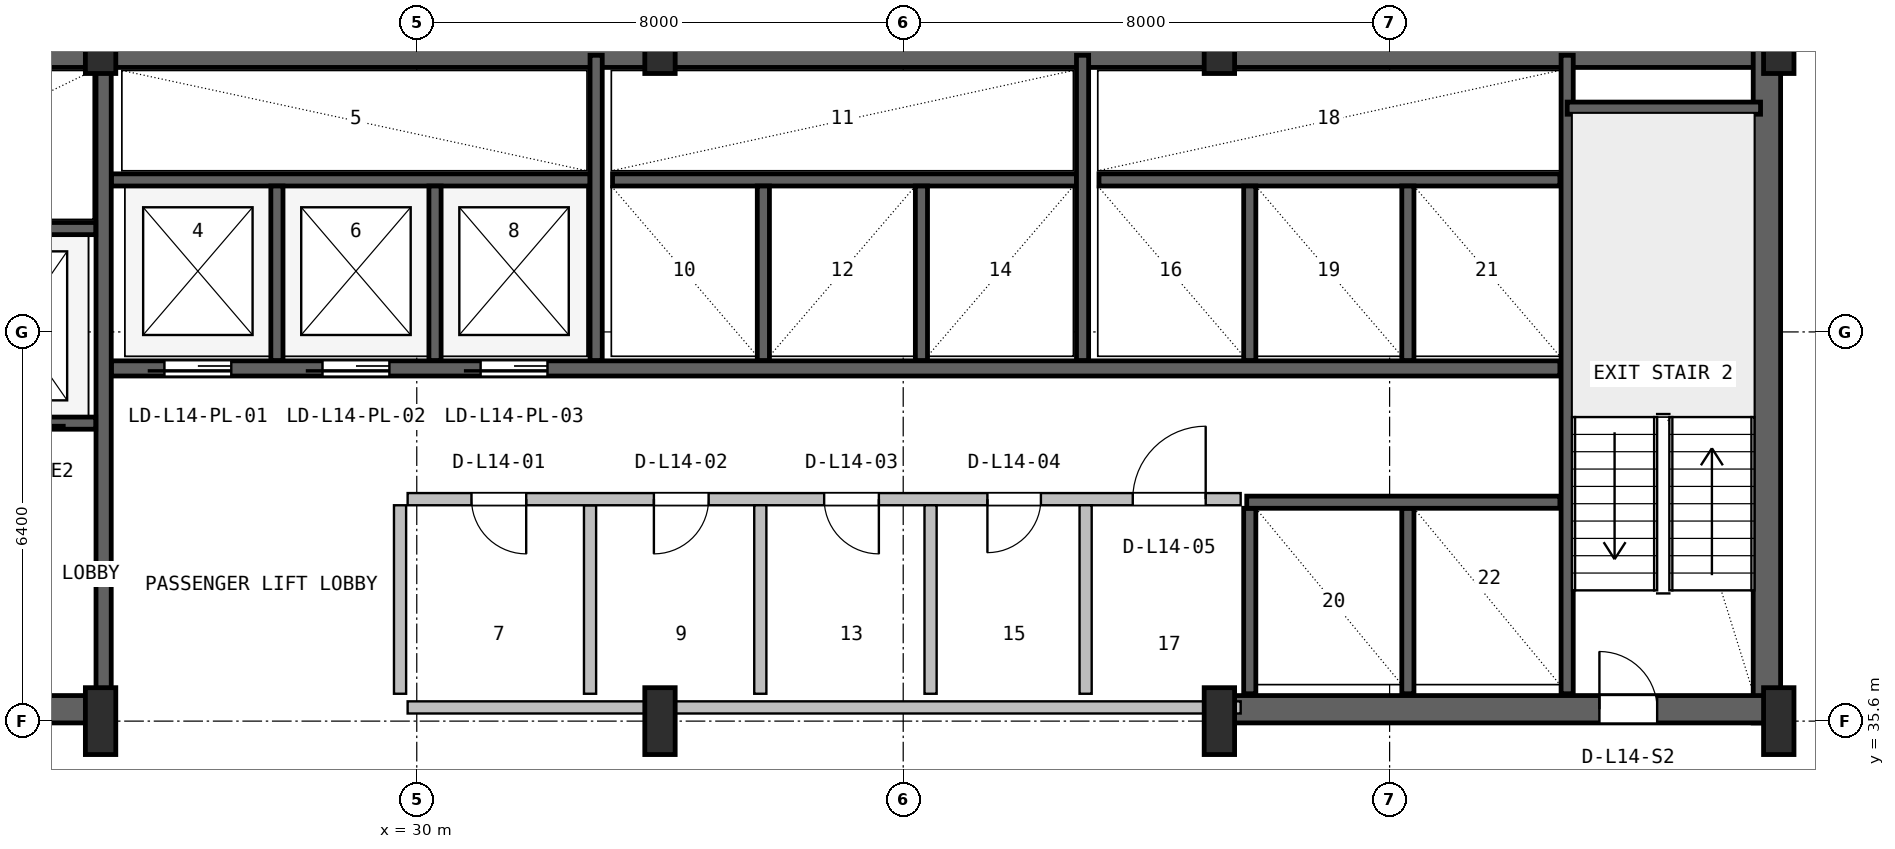
"""IFC4 building model, lengths in metres.
Left out: names, types, materials, properties, quantities, classifications, styles, units other than length and angle.
Written with IfcOpenShell. Run it as: python <this file> out.ifc"""

import sys

from ifc_helpers import new_model, si_unit, direction, frame, frame_2d, origin, origin_2d, place, context, subcontext, project, spatial, rectangle, i_section, extrude, source, transform, mapped, element, fill, save


model = new_model("IFC4")
c1 = context("Model", 3, precision=1e-05, world=origin(), true_north=direction((0.0, 1.0)))
c2 = subcontext(c1, "Body", "Model", "MODEL_VIEW")
j1 = project(units=[si_unit("LENGTHUNIT", "METRE"), si_unit("PLANEANGLEUNIT", "RADIAN")], contexts=[c1])
p1 = place(None, origin())
s1 = spatial("IfcSite", under=j1, at=p1, CompositionType="ELEMENT")
p2 = place(p1, origin())
s2 = spatial("IfcBuilding", under=s1, at=p2, CompositionType="ELEMENT")
p3 = place(p2, frame((0.0, 0.0, 62.7)))
s3 = spatial("IfcBuildingStorey", under=s2, at=p3, CompositionType="ELEMENT", Elevation=62.7)
p4 = place(p3, frame((15.6, 46.575, 0.0), z_axis=(0.0, 0.0, 1.0), x_axis=(1.0, 0.0, 0.0)))
e1 = element("IfcWall", 1, at=p4, inside=s3, PredefinedType="SHEAR", context=c2, shape_type="SweptSolid", body=[
    extrude(rectangle(XDim=36.8, YDim=0.45, at=frame_2d((18.4, 0.0))), origin(), (0.0, 0.0, 1.0), 3.65),
])
p5 = place(p3, frame((52.205, 35.57, 0.0), z_axis=(0.0, 0.0, 1.0), x_axis=(0.0, 1.0, 0.0)))
e2 = element("IfcWall", 2, at=p5, inside=s3, PredefinedType="SHEAR", context=c2, shape_type="SweptSolid", body=[
    extrude(rectangle(XDim=11.23, YDim=0.45, at=frame_2d((5.615, 0.0))), origin(), (0.0, 0.0, 1.0), 3.65),
])
p6 = place(p3, frame((15.57, 35.795, 0.0), z_axis=(0.0, 0.0, 1.0), x_axis=(1.0, 0.0, 0.0)))
e3 = element("IfcWall", 3, at=p6, inside=s3, PredefinedType="SHEAR", context=c2, shape_type="SweptSolid", body=[
    extrude(rectangle(XDim=9.23, YDim=0.45, at=frame_2d((4.615, 0.0))), origin(), (0.0, 0.0, 1.0), 3.65),
])
p7 = place(p6, frame((5.4, 0.0, 0.0)))
e4 = element("IfcOpeningElement", 4, at=p7, cuts=e3, PredefinedType="OPENING", context=c2, shape_type="SweptSolid", body=[
    extrude(rectangle(XDim=1.0, YDim=2.1, at=frame_2d((0.5, 1.05))), frame((0.0, 0.235, 0.0), z_axis=(0.0, -1.0, 0.0), x_axis=(1.0, 0.0, 0.0)), (0.0, 0.0, 1.0), 0.47),
])
p8 = place(p3, frame((43.2, 35.795, 0.0), z_axis=(0.0, 0.0, 1.0), x_axis=(1.0, 0.0, 0.0)))
e5 = element("IfcWall", 5, at=p8, inside=s3, PredefinedType="SHEAR", context=c2, shape_type="SweptSolid", body=[
    extrude(rectangle(XDim=9.23, YDim=0.45, at=frame_2d((4.615, 0.0))), origin(), (0.0, 0.0, 1.0), 3.65),
])
p9 = place(p8, frame((6.25, 0.0, 0.0)))
e6 = element("IfcOpeningElement", 6, at=p9, cuts=e5, PredefinedType="OPENING", context=c2, shape_type="SweptSolid", body=[
    extrude(rectangle(XDim=0.95, YDim=2.1, at=frame_2d((0.475, 1.05))), frame((0.0, 0.235, 0.0), z_axis=(0.0, -1.0, 0.0), x_axis=(1.0, 0.0, 0.0)), (0.0, 0.0, 1.0), 0.47),
])
m1 = source(origin(), c2, "Body", "SweptSolid", [
    extrude(i_section(OverallWidth=0.5, OverallDepth=1.1, WebThickness=0.018, FlangeThickness=0.032, FilletRadius=0.018, at=origin_2d()), origin(), (0.0, 0.0, 1.0), 3.9),
])
for number, where, z_axis, x_axis in (
    (7, (24.8, 35.6, 0.0), (0.0, 0.0, 1.0), (1.0, 0.0, 0.0)),
    (8, (24.8, 46.8, 0.0), (0.0, 0.0, 1.0), (1.0, 0.0, 0.0)),
    (9, (34.0, 35.6, 0.0), (0.0, 0.0, 1.0), (1.0, 0.0, 0.0)),
    (10, (34.0, 46.8, 0.0), (0.0, 0.0, 1.0), (1.0, 0.0, 0.0)),
    (11, (43.2, 35.6, 0.0), (0.0, 0.0, 1.0), (1.0, 0.0, 0.0)),
    (12, (43.2, 46.8, 0.0), (0.0, 0.0, 1.0), (1.0, 0.0, 0.0)),
    (13, (52.4, 35.6, 0.0), (0.0, 0.0, 1.0), (1.0, 0.0, 0.0)),
    (14, (52.4, 46.8, 0.0), (0.0, 0.0, 1.0), (1.0, 0.0, 0.0)),
):
    element("IfcColumn", number, at=place(p3, frame(where, z_axis=z_axis, x_axis=x_axis)), inside=s3, PredefinedType="COLUMN", context=c2, shape_type="MappedRepresentation", body=[
        mapped(m1, transform((0.0, 0.0, 0.0), x_axis=(1.0, 0.0, 0.0), y_axis=(0.0, 1.0, 0.0), z_axis=(0.0, 0.0, 1.0), scale=1.0)),
    ])
p10 = place(p3, frame((24.85, 36.05, 0.0), z_axis=(0.0, 0.0, 1.0), x_axis=(0.0, 1.0, 0.0)))
e15 = element("IfcWall", 15, at=p10, inside=s3, PredefinedType="SHEAR", context=c2, shape_type="SweptSolid", body=[
    extrude(rectangle(XDim=10.45, YDim=0.25, at=frame_2d((5.225, 0.0))), origin(), (0.0, 0.0, 1.0), 3.65),
])
p11 = place(p3, frame((19.2, 40.5, 0.0), z_axis=(0.0, 0.0, 1.0), x_axis=(1.0, 0.0, 0.0)))
e16 = element("IfcWall", 16, at=p11, inside=s3, PredefinedType="SHEAR", context=c2, shape_type="SweptSolid", body=[
    extrude(rectangle(XDim=5.52, YDim=0.2, at=frame_2d((2.76, 0.0))), origin(), (0.0, 0.0, 1.0), 3.65),
])
p12 = place(p11, frame((1.05, 0.0, 0.0)))
e17 = element("IfcOpeningElement", 17, at=p12, cuts=e16, PredefinedType="OPENING", context=c2, shape_type="SweptSolid", body=[
    extrude(rectangle(XDim=1.1, YDim=2.18, at=frame_2d((0.55, 1.09))), frame((0.0, 0.11, 0.0), z_axis=(0.0, -1.0, 0.0), x_axis=(1.0, 0.0, 0.0)), (0.0, 0.0, 1.0), 0.22),
])
p13 = place(p11, frame((3.65, 0.0, 0.0)))
e18 = element("IfcOpeningElement", 18, at=p13, cuts=e16, PredefinedType="OPENING", context=c2, shape_type="SweptSolid", body=[
    extrude(rectangle(XDim=1.1, YDim=2.18, at=frame_2d((0.55, 1.09))), frame((0.0, 0.11, 0.0), z_axis=(0.0, -1.0, 0.0), x_axis=(1.0, 0.0, 0.0)), (0.0, 0.0, 1.0), 0.22),
])
p14 = place(p3, frame((19.2, 43.7, 0.0), z_axis=(0.0, 0.0, 1.0), x_axis=(1.0, 0.0, 0.0)))
e19 = element("IfcWall", 19, at=p14, inside=s3, PredefinedType="SHEAR", context=c2, shape_type="SweptSolid", body=[
    extrude(rectangle(XDim=5.52, YDim=0.2, at=frame_2d((2.76, 0.0))), origin(), (0.0, 0.0, 1.0), 3.65),
])
p15 = place(p3, frame((48.92, 36.05, 0.0), z_axis=(0.0, 0.0, 1.0), x_axis=(0.0, 1.0, 0.0)))
e20 = element("IfcWall", 20, at=p15, inside=s3, PredefinedType="SHEAR", context=c2, shape_type="SweptSolid", body=[
    extrude(rectangle(XDim=10.5, YDim=0.2, at=frame_2d((5.25, 0.0))), origin(), (0.0, 0.0, 1.0), 3.65),
])
p16 = place(p3, frame((48.92, 45.68, 0.0), z_axis=(0.0, 0.0, 1.0), x_axis=(1.0, 0.0, 0.0)))
e21 = element("IfcWall", 21, at=p16, inside=s3, PredefinedType="SHEAR", context=c2, shape_type="SweptSolid", body=[
    extrude(rectangle(XDim=3.18, YDim=0.2, at=frame_2d((1.59, 0.0))), origin(), (0.0, 0.0, 1.0), 3.65),
])
p17 = place(p3, frame((24.98, 41.4, 0.0), z_axis=(0.0, 0.0, 1.0), x_axis=(1.0, 0.0, 0.0)))
e22 = element("IfcWall", 22, at=p17, inside=s3, PredefinedType="SHEAR", context=c2, shape_type="SweptSolid", body=[
    extrude(rectangle(XDim=23.82, YDim=0.25, at=frame_2d((11.91, 0.0))), origin(), (0.0, 0.0, 1.0), 3.65),
])
p18 = place(p17, frame((0.87, 0.0, 0.0)))
e23 = element("IfcOpeningElement", 23, at=p18, cuts=e22, PredefinedType="OPENING", context=c2, shape_type="SweptSolid", body=[
    extrude(rectangle(XDim=1.1, YDim=2.18, at=frame_2d((0.55, 1.09))), frame((0.0, 0.135, 0.0), z_axis=(0.0, -1.0, 0.0), x_axis=(1.0, 0.0, 0.0)), (0.0, 0.0, 1.0), 0.27),
])
p19 = place(p17, frame((3.47, 0.0, 0.0)))
e24 = element("IfcOpeningElement", 24, at=p19, cuts=e22, PredefinedType="OPENING", context=c2, shape_type="SweptSolid", body=[
    extrude(rectangle(XDim=1.1, YDim=2.18, at=frame_2d((0.55, 1.09))), frame((0.0, 0.135, 0.0), z_axis=(0.0, -1.0, 0.0), x_axis=(1.0, 0.0, 0.0)), (0.0, 0.0, 1.0), 0.27),
])
p20 = place(p17, frame((6.07, 0.0, 0.0)))
e25 = element("IfcOpeningElement", 25, at=p20, cuts=e22, PredefinedType="OPENING", context=c2, shape_type="SweptSolid", body=[
    extrude(rectangle(XDim=1.1, YDim=2.18, at=frame_2d((0.55, 1.09))), frame((0.0, 0.135, 0.0), z_axis=(0.0, -1.0, 0.0), x_axis=(1.0, 0.0, 0.0)), (0.0, 0.0, 1.0), 0.27),
])
p21 = place(p3, frame((24.98, 44.5, 0.0), z_axis=(0.0, 0.0, 1.0), x_axis=(1.0, 0.0, 0.0)))
e26 = element("IfcWall", 26, at=p21, inside=s3, PredefinedType="SHEAR", context=c2, shape_type="SweptSolid", body=[
    extrude(rectangle(XDim=7.87, YDim=0.2, at=frame_2d((3.935, 0.0))), origin(), (0.0, 0.0, 1.0), 3.65),
])
for number, where, z_axis, x_axis in (
    (27, (27.7, 41.53, 0.0), (0.0, 0.0, 1.0), (0.0, 1.0, 0.0)),
    (28, (30.3, 41.53, 0.0), (0.0, 0.0, 1.0), (0.0, 1.0, 0.0)),
):
    element("IfcWall", number, at=place(p3, frame(where, z_axis=z_axis, x_axis=x_axis)), inside=s3, PredefinedType="SHEAR", context=c2, shape_type="SweptSolid", body=[
        extrude(rectangle(XDim=2.87, YDim=0.2, at=frame_2d((1.435, 0.0))), origin(), (0.0, 0.0, 1.0), 3.65),
    ])
p22 = place(p3, frame((32.95, 41.53, 0.0), z_axis=(0.0, 0.0, 1.0), x_axis=(0.0, 1.0, 0.0)))
e29 = element("IfcWall", 29, at=p22, inside=s3, PredefinedType="SHEAR", context=c2, shape_type="SweptSolid", body=[
    extrude(rectangle(XDim=5.02, YDim=0.2, at=frame_2d((2.51, 0.0))), origin(), (0.0, 0.0, 1.0), 3.65),
])
p23 = place(p3, frame((33.22, 44.5, 0.0), z_axis=(0.0, 0.0, 1.0), x_axis=(1.0, 0.0, 0.0)))
e30 = element("IfcWall", 30, at=p23, inside=s3, PredefinedType="SHEAR", context=c2, shape_type="SweptSolid", body=[
    extrude(rectangle(XDim=7.63, YDim=0.2, at=frame_2d((3.815, 0.0))), origin(), (0.0, 0.0, 1.0), 3.65),
])
for number, where, z_axis, x_axis in (
    (31, (35.7, 41.53, 0.0), (0.0, 0.0, 1.0), (0.0, 1.0, 0.0)),
    (32, (38.3, 41.53, 0.0), (0.0, 0.0, 1.0), (0.0, 1.0, 0.0)),
):
    element("IfcWall", number, at=place(p3, frame(where, z_axis=z_axis, x_axis=x_axis)), inside=s3, PredefinedType="SHEAR", context=c2, shape_type="SweptSolid", body=[
        extrude(rectangle(XDim=2.87, YDim=0.2, at=frame_2d((1.435, 0.0))), origin(), (0.0, 0.0, 1.0), 3.65),
    ])
p24 = place(p3, frame((40.95, 41.53, 0.0), z_axis=(0.0, 0.0, 1.0), x_axis=(0.0, 1.0, 0.0)))
e33 = element("IfcWall", 33, at=p24, inside=s3, PredefinedType="SHEAR", context=c2, shape_type="SweptSolid", body=[
    extrude(rectangle(XDim=5.02, YDim=0.2, at=frame_2d((2.51, 0.0))), origin(), (0.0, 0.0, 1.0), 3.65),
])
p25 = place(p3, frame((41.22, 44.5, 0.0), z_axis=(0.0, 0.0, 1.0), x_axis=(1.0, 0.0, 0.0)))
e34 = element("IfcWall", 34, at=p25, inside=s3, PredefinedType="SHEAR", context=c2, shape_type="SweptSolid", body=[
    extrude(rectangle(XDim=7.58, YDim=0.2, at=frame_2d((3.79, 0.0))), origin(), (0.0, 0.0, 1.0), 3.65),
])
for number, where, z_axis, x_axis in (
    (35, (43.7, 41.53, 0.0), (0.0, 0.0, 1.0), (0.0, 1.0, 0.0)),
    (36, (46.3, 41.53, 0.0), (0.0, 0.0, 1.0), (0.0, 1.0, 0.0)),
):
    element("IfcWall", number, at=place(p3, frame(where, z_axis=z_axis, x_axis=x_axis)), inside=s3, PredefinedType="SHEAR", context=c2, shape_type="SweptSolid", body=[
        extrude(rectangle(XDim=2.87, YDim=0.2, at=frame_2d((1.435, 0.0))), origin(), (0.0, 0.0, 1.0), 3.65),
    ])
for number, where, z_axis, x_axis in (
    (37, (43.7, 36.05, 0.0), (0.0, 0.0, 1.0), (0.0, 1.0, 0.0)),
    (38, (46.3, 36.05, 0.0), (0.0, 0.0, 1.0), (0.0, 1.0, 0.0)),
):
    element("IfcWall", number, at=place(p3, frame(where, z_axis=z_axis, x_axis=x_axis)), inside=s3, PredefinedType="SHEAR", context=c2, shape_type="SweptSolid", body=[
        extrude(rectangle(XDim=3.05, YDim=0.2, at=frame_2d((1.525, 0.0))), origin(), (0.0, 0.0, 1.0), 3.65),
    ])
p26 = place(p3, frame((43.65, 39.2, 0.0), z_axis=(0.0, 0.0, 1.0), x_axis=(1.0, 0.0, 0.0)))
e39 = element("IfcWall", 39, at=p26, inside=s3, PredefinedType="SHEAR", context=c2, shape_type="SweptSolid", body=[
    extrude(rectangle(XDim=5.15, YDim=0.2, at=frame_2d((2.575, 0.0))), origin(), (0.0, 0.0, 1.0), 3.65),
])
p27 = place(p3, frame((29.85, 35.825, 0.0), z_axis=(0.0, 0.0, 1.0), x_axis=(1.0, 0.0, 0.0)))
e40 = element("IfcWall", 40, at=p27, inside=s3, PredefinedType="SOLIDWALL", context=c2, shape_type="SweptSolid", body=[
    extrude(rectangle(XDim=13.7, YDim=0.2, at=frame_2d((6.85, 0.0))), origin(), (0.0, 0.0, 1.0), 2.425),
])
p28 = place(p3, frame((32.85, 36.05, 0.0), z_axis=(0.0, 0.0, 1.0), x_axis=(0.0, 1.0, 0.0)))
e41 = element("IfcWall", 41, at=p28, inside=s3, PredefinedType="PLUMBINGWALL", context=c2, shape_type="SweptSolid", body=[
    extrude(rectangle(XDim=3.1, YDim=0.2, at=frame_2d((1.55, 0.0))), origin(), (0.0, 0.0, 1.0), 3.63),
])
p29 = place(p3, frame((29.85, 39.25, 0.0), z_axis=(0.0, 0.0, 1.0), x_axis=(1.0, 0.0, 0.0)))
e42 = element("IfcWall", 42, at=p29, inside=s3, PredefinedType="SOLIDWALL", context=c2, shape_type="SweptSolid", body=[
    extrude(rectangle(XDim=13.7, YDim=0.2, at=frame_2d((6.85, 0.0))), origin(), (0.0, 0.0, 1.0), 3.63),
])
p30 = place(p29, frame((1.05, 0.0, 0.0)))
e43 = element("IfcOpeningElement", 43, at=p30, cuts=e42, PredefinedType="OPENING", context=c2, shape_type="SweptSolid", body=[
    extrude(rectangle(XDim=0.9, YDim=2.06, at=frame_2d((0.45, 1.03))), frame((0.0, 0.11, 0.0), z_axis=(0.0, -1.0, 0.0), x_axis=(1.0, 0.0, 0.0)), (0.0, 0.0, 1.0), 0.22),
])
p31 = place(p29, frame((4.05, 0.0, 0.0)))
e44 = element("IfcOpeningElement", 44, at=p31, cuts=e42, PredefinedType="OPENING", context=c2, shape_type="SweptSolid", body=[
    extrude(rectangle(XDim=0.9, YDim=2.06, at=frame_2d((0.45, 1.03))), frame((0.0, 0.11, 0.0), z_axis=(0.0, -1.0, 0.0), x_axis=(1.0, 0.0, 0.0)), (0.0, 0.0, 1.0), 0.22),
])
p32 = place(p29, frame((6.85, 0.0, 0.0)))
e45 = element("IfcOpeningElement", 45, at=p32, cuts=e42, PredefinedType="OPENING", context=c2, shape_type="SweptSolid", body=[
    extrude(rectangle(XDim=0.9, YDim=2.06, at=frame_2d((0.45, 1.03))), frame((0.0, 0.11, 0.0), z_axis=(0.0, -1.0, 0.0), x_axis=(1.0, 0.0, 0.0)), (0.0, 0.0, 1.0), 0.22),
])
p33 = place(p29, frame((9.535, 0.0, 0.0)))
e46 = element("IfcOpeningElement", 46, at=p33, cuts=e42, PredefinedType="OPENING", context=c2, shape_type="SweptSolid", body=[
    extrude(rectangle(XDim=0.88, YDim=2.06, at=frame_2d((0.44, 1.03))), frame((0.0, 0.11, 0.0), z_axis=(0.0, -1.0, 0.0), x_axis=(1.0, 0.0, 0.0)), (0.0, 0.0, 1.0), 0.22),
])
p34 = place(p29, frame((11.925, 0.0, 0.0)))
e47 = element("IfcOpeningElement", 47, at=p34, cuts=e42, PredefinedType="OPENING", context=c2, shape_type="SweptSolid", body=[
    extrude(rectangle(XDim=1.2, YDim=2.1, at=frame_2d((0.6, 1.05))), frame((0.0, 0.11, 0.0), z_axis=(0.0, -1.0, 0.0), x_axis=(1.0, 0.0, 0.0)), (0.0, 0.0, 1.0), 0.22),
])
for number, where, z_axis, x_axis in (
    (48, (29.725, 36.05, 0.0), (0.0, 0.0, 1.0), (0.0, 1.0, 0.0)),
    (49, (35.65, 36.05, 0.0), (0.0, 0.0, 1.0), (0.0, 1.0, 0.0)),
    (50, (38.45, 36.05, 0.0), (0.0, 0.0, 1.0), (0.0, 1.0, 0.0)),
):
    element("IfcWall", number, at=place(p3, frame(where, z_axis=z_axis, x_axis=x_axis)), inside=s3, PredefinedType="PLUMBINGWALL", context=c2, shape_type="SweptSolid", body=[
        extrude(rectangle(XDim=3.1, YDim=0.2, at=frame_2d((1.55, 0.0))), origin(), (0.0, 0.0, 1.0), 3.63),
    ])
p35 = place(p3, frame((41.0, 36.05, 0.0), z_axis=(0.0, 0.0, 1.0), x_axis=(0.0, 1.0, 0.0)))
e51 = element("IfcWall", 51, at=p35, inside=s3, PredefinedType="SOLIDWALL", context=c2, shape_type="SweptSolid", body=[
    extrude(rectangle(XDim=3.1, YDim=0.2, at=frame_2d((1.55, 0.0))), origin(), (0.0, 0.0, 1.0), 3.63),
])
m2 = source(origin(), c2, "Body", "SweptSolid", [
    extrude(rectangle(XDim=0.95, YDim=2.1, at=frame_2d((0.475, 1.05))), frame((0.0, 0.025, 0.0), z_axis=(0.0, -1.0, 0.0), x_axis=(1.0, 0.0, 0.0)), (0.0, 0.0, 1.0), 0.05),
])
p36 = place(p9, origin())
e52 = element("IfcDoor", 52, at=p36, inside=s3, OperationType="SINGLE_SWING_LEFT", PredefinedType="DOOR", context=c2, shape_type="MappedRepresentation", body=[
    mapped(m2, transform((0.0, 0.0, 0.0), x_axis=(1.0, 0.0, 0.0), y_axis=(0.0, 1.0, 0.0), z_axis=(0.0, 0.0, 1.0), scale=1.0)),
])
fill(e6, e52)
m3 = source(origin(), c2, "Body", "SweptSolid", [
    extrude(rectangle(XDim=1.1, YDim=2.18, at=frame_2d((0.55, 1.09))), frame((0.0, 0.025, 0.0), z_axis=(0.0, -1.0, 0.0), x_axis=(1.0, 0.0, 0.0)), (0.0, 0.0, 1.0), 0.05),
])
p37 = place(p18, frame((1.1, 0.0, 0.0), z_axis=(0.0, 0.0, 1.0), x_axis=(-1.0, 0.0, 0.0)))
e53 = element("IfcDoor", 53, at=p37, inside=s3, OperationType="SLIDING_TO_LEFT", PredefinedType="DOOR", context=c2, shape_type="MappedRepresentation", body=[
    mapped(m3, transform((0.0, 0.0, 0.0), x_axis=(1.0, 0.0, 0.0), y_axis=(0.0, 1.0, 0.0), z_axis=(0.0, 0.0, 1.0), scale=1.0)),
])
fill(e23, e53)
p38 = place(p19, frame((1.1, 0.0, 0.0), z_axis=(0.0, 0.0, 1.0), x_axis=(-1.0, 0.0, 0.0)))
e54 = element("IfcDoor", 54, at=p38, inside=s3, OperationType="SLIDING_TO_LEFT", PredefinedType="DOOR", context=c2, shape_type="MappedRepresentation", body=[
    mapped(m3, transform((0.0, 0.0, 0.0), x_axis=(1.0, 0.0, 0.0), y_axis=(0.0, 1.0, 0.0), z_axis=(0.0, 0.0, 1.0), scale=1.0)),
])
fill(e24, e54)
p39 = place(p20, frame((1.1, 0.0, 0.0), z_axis=(0.0, 0.0, 1.0), x_axis=(-1.0, 0.0, 0.0)))
e55 = element("IfcDoor", 55, at=p39, inside=s3, OperationType="SLIDING_TO_LEFT", PredefinedType="DOOR", context=c2, shape_type="MappedRepresentation", body=[
    mapped(m3, transform((0.0, 0.0, 0.0), x_axis=(1.0, 0.0, 0.0), y_axis=(0.0, 1.0, 0.0), z_axis=(0.0, 0.0, 1.0), scale=1.0)),
])
fill(e25, e55)
m4 = source(origin(), c2, "Body", "SweptSolid", [
    extrude(rectangle(XDim=0.9, YDim=2.06, at=frame_2d((0.45, 1.03))), frame((0.0, 0.025, 0.0), z_axis=(0.0, -1.0, 0.0), x_axis=(1.0, 0.0, 0.0)), (0.0, 0.0, 1.0), 0.05),
])
p40 = place(p30, frame((0.9, 0.0, 0.0), z_axis=(0.0, 0.0, 1.0), x_axis=(-1.0, 0.0, 0.0)))
e56 = element("IfcDoor", 56, at=p40, inside=s3, OperationType="SINGLE_SWING_RIGHT", PredefinedType="DOOR", context=c2, shape_type="MappedRepresentation", body=[
    mapped(m4, transform((0.0, 0.0, 0.0), x_axis=(1.0, 0.0, 0.0), y_axis=(0.0, 1.0, 0.0), z_axis=(0.0, 0.0, 1.0), scale=1.0)),
])
fill(e43, e56)
p41 = place(p31, frame((0.9, 0.0, 0.0), z_axis=(0.0, 0.0, 1.0), x_axis=(-1.0, 0.0, 0.0)))
e57 = element("IfcDoor", 57, at=p41, inside=s3, OperationType="SINGLE_SWING_LEFT", PredefinedType="DOOR", context=c2, shape_type="MappedRepresentation", body=[
    mapped(m4, transform((0.0, 0.0, 0.0), x_axis=(1.0, 0.0, 0.0), y_axis=(0.0, 1.0, 0.0), z_axis=(0.0, 0.0, 1.0), scale=1.0)),
])
fill(e44, e57)
p42 = place(p32, frame((0.9, 0.0, 0.0), z_axis=(0.0, 0.0, 1.0), x_axis=(-1.0, 0.0, 0.0)))
e58 = element("IfcDoor", 58, at=p42, inside=s3, OperationType="SINGLE_SWING_RIGHT", PredefinedType="DOOR", context=c2, shape_type="MappedRepresentation", body=[
    mapped(m4, transform((0.0, 0.0, 0.0), x_axis=(1.0, 0.0, 0.0), y_axis=(0.0, 1.0, 0.0), z_axis=(0.0, 0.0, 1.0), scale=1.0)),
])
fill(e45, e58)
m5 = source(origin(), c2, "Body", "SweptSolid", [
    extrude(rectangle(XDim=0.88, YDim=2.06, at=frame_2d((0.44, 1.03))), frame((0.0, 0.025, 0.0), z_axis=(0.0, -1.0, 0.0), x_axis=(1.0, 0.0, 0.0)), (0.0, 0.0, 1.0), 0.05),
])
p43 = place(p33, frame((0.88, 0.0, 0.0), z_axis=(0.0, 0.0, 1.0), x_axis=(-1.0, 0.0, 0.0)))
e59 = element("IfcDoor", 59, at=p43, inside=s3, OperationType="SINGLE_SWING_LEFT", PredefinedType="DOOR", context=c2, shape_type="MappedRepresentation", body=[
    mapped(m5, transform((0.0, 0.0, 0.0), x_axis=(1.0, 0.0, 0.0), y_axis=(0.0, 1.0, 0.0), z_axis=(0.0, 0.0, 1.0), scale=1.0)),
])
fill(e46, e59)
m6 = source(origin(), c2, "Body", "SweptSolid", [
    extrude(rectangle(XDim=1.2, YDim=2.1, at=frame_2d((0.6, 1.05))), frame((0.0, 0.025, 0.0), z_axis=(0.0, -1.0, 0.0), x_axis=(1.0, 0.0, 0.0)), (0.0, 0.0, 1.0), 0.05),
])
p44 = place(p34, origin())
e60 = element("IfcDoor", 60, at=p44, inside=s3, OperationType="SINGLE_SWING_RIGHT", PredefinedType="DOOR", context=c2, shape_type="MappedRepresentation", body=[
    mapped(m6, transform((0.0, 0.0, 0.0), x_axis=(1.0, 0.0, 0.0), y_axis=(0.0, 1.0, 0.0), z_axis=(0.0, 0.0, 1.0), scale=1.0)),
])
fill(e47, e60)
save(model, sys.argv[1])
